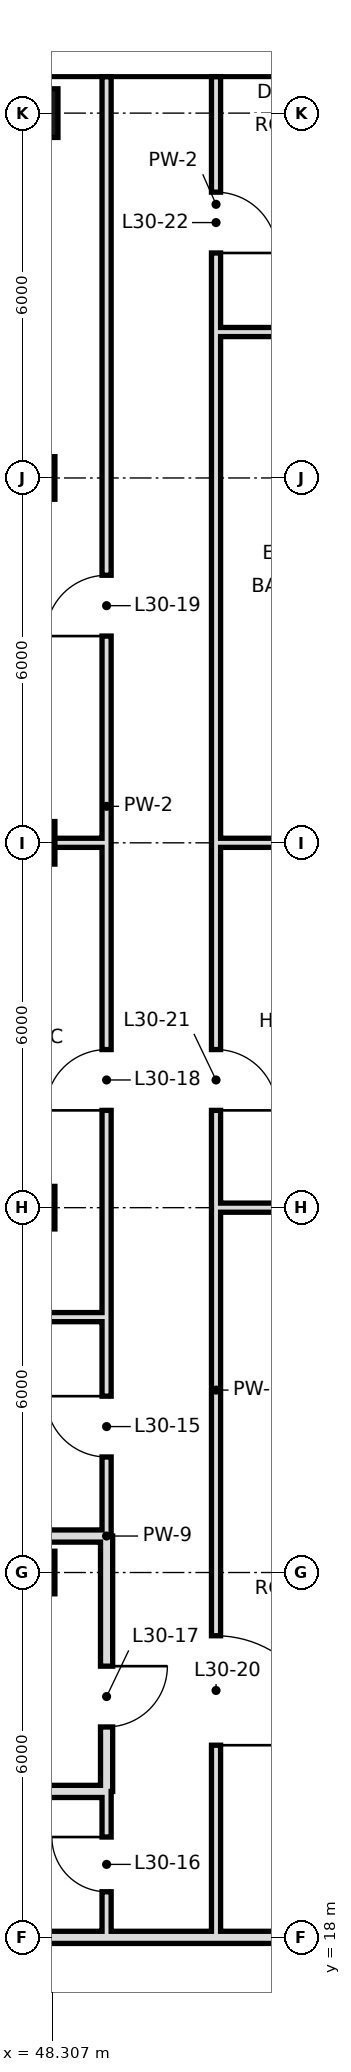
"""IFC4 building model, lengths in metres.
Left out: names, types, materials, properties, quantities, classifications, styles, units other than length and angle.
Written with IfcOpenShell. Run it as: python <this file> out.ifc"""

import sys

from ifc_helpers import new_model, si_unit, direction, frame, frame_2d, origin, origin_2d, place, context, subcontext, project, spatial, rectangle, hollow_rectangle, extrude, element, fill, save


model = new_model("IFC4")
c1 = context("Model", 3, precision=1e-05, world=origin(), true_north=direction((0.0, 1.0)))
c2 = subcontext(c1, "Body", "Model", "MODEL_VIEW")
j1 = project(units=[si_unit("LENGTHUNIT", "METRE"), si_unit("PLANEANGLEUNIT", "RADIAN")], contexts=[c1])
p1 = place(None, origin())
s1 = spatial("IfcSite", under=j1, at=p1, CompositionType="ELEMENT")
p2 = place(p1, origin())
s2 = spatial("IfcBuilding", under=s1, at=p2, CompositionType="ELEMENT")
p3 = place(p2, frame((0.0, 0.0, 134.0)))
s3 = spatial("IfcBuildingStorey", under=s2, at=p3, CompositionType="ELEMENT", Elevation=134.0)
for number, where, z_axis, x_axis in (
    (1, (48.0, 24.0, 0.0), (0.0, 0.0, 1.0), (1.0, 0.0, 0.0)),
    (2, (48.0, 30.0, 0.0), (0.0, 0.0, 1.0), (1.0, 0.0, 0.0)),
    (3, (48.0, 36.0, 0.0), (0.0, 0.0, 1.0), (1.0, 0.0, 0.0)),
    (4, (48.0, 42.0, 0.0), (0.0, 0.0, 1.0), (1.0, 0.0, 0.0)),
):
    element("IfcColumn", number, at=place(p3, frame(where, z_axis=z_axis, x_axis=x_axis)), inside=s3, PredefinedType="COLUMN", context=c2, shape_type="SweptSolid", body=[
        extrude(hollow_rectangle(XDim=0.7, YDim=0.7, WallThickness=0.036, at=origin_2d()), origin(), (0.0, 0.0, 1.0), 4.4),
    ])
p4 = place(p3, frame((48.0, 48.0, 0.0), z_axis=(0.0, 0.0, 1.0), x_axis=(1.0, 0.0, 0.0)))
e5 = element("IfcColumn", 5, at=p4, inside=s3, PredefinedType="COLUMN", context=c2, shape_type="SweptSolid", body=[
    extrude(hollow_rectangle(XDim=0.8, YDim=0.8, WallThickness=0.04, at=origin_2d()), origin(), (0.0, 0.0, 1.0), 4.4),
])
p5 = place(p3, frame((49.2, 20.4, 0.0), z_axis=(0.0, 0.0, 1.0), x_axis=(0.0, 1.0, 0.0)))
e6 = element("IfcWall", 6, at=p5, inside=s3, PredefinedType="SOLIDWALL", context=c2, shape_type="SweptSolid", body=[
    extrude(rectangle(XDim=4.2, YDim=0.2, at=frame_2d((2.1, 0.0))), origin(), (0.0, 0.0, 1.0), 3.4),
])
p6 = place(p5, frame((1.06, 0.0, 0.0)))
e7 = element("IfcOpeningElement", 7, at=p6, cuts=e6, PredefinedType="OPENING", context=c2, shape_type="SweptSolid", body=[
    extrude(rectangle(XDim=1.0, YDim=2.4, at=frame_2d((0.5, 1.2))), frame((0.0, 0.11, 0.0), z_axis=(0.0, -1.0, 0.0), x_axis=(1.0, 0.0, 0.0)), (0.0, 0.0, 1.0), 0.22),
])
p7 = place(p3, frame((49.2, 24.6, 0.0), z_axis=(0.0, 0.0, 1.0), x_axis=(0.0, 1.0, 0.0)))
e8 = element("IfcWall", 8, at=p7, inside=s3, PredefinedType="PARTITIONING", context=c2, shape_type="SweptSolid", body=[
    extrude(rectangle(XDim=24.0, YDim=0.15, at=frame_2d((12.0, 0.0))), origin(), (0.0, 0.0, 1.0), 4.1),
])
p8 = place(p7, frame((1.3, 0.0, 0.0)))
e9 = element("IfcOpeningElement", 9, at=p8, cuts=e8, PredefinedType="OPENING", context=c2, shape_type="SweptSolid", body=[
    extrude(rectangle(XDim=1.0, YDim=2.4, at=frame_2d((0.5, 1.2))), frame((0.0, 0.085, 0.0), z_axis=(0.0, -1.0, 0.0), x_axis=(1.0, 0.0, 0.0)), (0.0, 0.0, 1.0), 0.17),
])
p9 = place(p7, frame((7.0, 0.0, 0.0)))
e10 = element("IfcOpeningElement", 10, at=p9, cuts=e8, PredefinedType="OPENING", context=c2, shape_type="SweptSolid", body=[
    extrude(rectangle(XDim=1.0, YDim=2.4, at=frame_2d((0.5, 1.2))), frame((0.0, 0.085, 0.0), z_axis=(0.0, -1.0, 0.0), x_axis=(1.0, 0.0, 0.0)), (0.0, 0.0, 1.0), 0.17),
])
p10 = place(p7, frame((14.8, 0.0, 0.0)))
e11 = element("IfcOpeningElement", 11, at=p10, cuts=e8, PredefinedType="OPENING", context=c2, shape_type="SweptSolid", body=[
    extrude(rectangle(XDim=1.0, YDim=2.4, at=frame_2d((0.5, 1.2))), frame((0.0, 0.085, 0.0), z_axis=(0.0, -1.0, 0.0), x_axis=(1.0, 0.0, 0.0)), (0.0, 0.0, 1.0), 0.17),
])
p11 = place(p3, frame((49.2, 18.0, 0.0), z_axis=(0.0, 0.0, 1.0), x_axis=(0.0, 1.0, 0.0)))
e12 = element("IfcWall", 12, at=p11, inside=s3, PredefinedType="PARTITIONING", context=c2, shape_type="SweptSolid", body=[
    extrude(rectangle(XDim=2.4, YDim=0.15, at=frame_2d((1.2, 0.0))), origin(), (0.0, 0.0, 1.0), 4.1),
])
p12 = place(p11, frame((0.75, 0.0, 0.0)))
e13 = element("IfcOpeningElement", 13, at=p12, cuts=e12, PredefinedType="OPENING", context=c2, shape_type="SweptSolid", body=[
    extrude(rectangle(XDim=0.9, YDim=2.4, at=frame_2d((0.45, 1.2))), frame((0.0, 0.085, 0.0), z_axis=(0.0, -1.0, 0.0), x_axis=(1.0, 0.0, 0.0)), (0.0, 0.0, 1.0), 0.17),
])
p13 = place(p3, frame((51.0, 18.0, 0.0), z_axis=(0.0, 0.0, 1.0), x_axis=(0.0, 1.0, 0.0)))
e14 = element("IfcWall", 14, at=p13, inside=s3, PredefinedType="PARTITIONING", context=c2, shape_type="SweptSolid", body=[
    extrude(rectangle(XDim=18.0, YDim=0.15, at=frame_2d((9.0, 0.0))), origin(), (0.0, 0.0, 1.0), 4.1),
])
p14 = place(p13, frame((3.16, 0.0, 0.0)))
e15 = element("IfcOpeningElement", 15, at=p14, cuts=e14, PredefinedType="OPENING", context=c2, shape_type="SweptSolid", body=[
    extrude(rectangle(XDim=1.8, YDim=2.4, at=frame_2d((0.9, 1.2))), frame((0.0, 0.085, 0.0), z_axis=(0.0, -1.0, 0.0), x_axis=(1.0, 0.0, 0.0)), (0.0, 0.0, 1.0), 0.17),
])
p15 = place(p13, frame((13.6, 0.0, 0.0)))
e16 = element("IfcOpeningElement", 16, at=p15, cuts=e14, PredefinedType="OPENING", context=c2, shape_type="SweptSolid", body=[
    extrude(rectangle(XDim=1.0, YDim=2.4, at=frame_2d((0.5, 1.2))), frame((0.0, 0.085, 0.0), z_axis=(0.0, -1.0, 0.0), x_axis=(1.0, 0.0, 0.0)), (0.0, 0.0, 1.0), 0.17),
])
p16 = place(p3, frame((51.0, 44.4, 0.0), z_axis=(0.0, 0.0, 1.0), x_axis=(0.0, 1.0, 0.0)))
e17 = element("IfcWall", 17, at=p16, inside=s3, PredefinedType="PARTITIONING", context=c2, shape_type="SweptSolid", body=[
    extrude(rectangle(XDim=4.2, YDim=0.15, at=frame_2d((2.1, 0.0))), origin(), (0.0, 0.0, 1.0), 4.1),
])
p17 = place(p16, frame((1.3, 0.0, 0.0)))
e18 = element("IfcOpeningElement", 18, at=p17, cuts=e17, PredefinedType="OPENING", context=c2, shape_type="SweptSolid", body=[
    extrude(rectangle(XDim=1.0, YDim=2.4, at=frame_2d((0.5, 1.2))), frame((0.0, 0.085, 0.0), z_axis=(0.0, -1.0, 0.0), x_axis=(1.0, 0.0, 0.0)), (0.0, 0.0, 1.0), 0.17),
])
p18 = place(p3, frame((51.0, 36.0, 0.0), z_axis=(0.0, 0.0, 1.0), x_axis=(0.0, 1.0, 0.0)))
e19 = element("IfcWall", 19, at=p18, inside=s3, PredefinedType="PARTITIONING", context=c2, shape_type="SweptSolid", body=[
    extrude(rectangle(XDim=8.4, YDim=0.15, at=frame_2d((4.2, 0.0))), origin(), (0.0, 0.0, 1.0), 4.1),
])
p19 = place(p3, frame((44.902, 18.0, 0.0), z_axis=(0.0, 0.0, 1.0), x_axis=(1.0, 0.0, 0.0)))
e20 = element("IfcWall", 20, at=p19, inside=s3, PredefinedType="SOLIDWALL", context=c2, shape_type="SweptSolid", body=[
    extrude(rectangle(XDim=15.698, YDim=0.2, at=frame_2d((7.849, 0.0))), origin(), (0.0, 0.0, 1.0), 3.4),
])
p20 = place(p3, frame((44.9, 20.4, 0.0), z_axis=(0.0, 0.0, 1.0), x_axis=(1.0, 0.0, 0.0)))
e21 = element("IfcWall", 21, at=p20, inside=s3, PredefinedType="SOLIDWALL", context=c2, shape_type="SweptSolid", body=[
    extrude(rectangle(XDim=4.3, YDim=0.2, at=frame_2d((2.15, 0.0))), origin(), (0.0, 0.0, 1.0), 3.4),
])
p21 = place(p3, frame((44.9, 24.6, 0.0), z_axis=(0.0, 0.0, 1.0), x_axis=(1.0, 0.0, 0.0)))
e22 = element("IfcWall", 22, at=p21, inside=s3, PredefinedType="SOLIDWALL", context=c2, shape_type="SweptSolid", body=[
    extrude(rectangle(XDim=4.3, YDim=0.2, at=frame_2d((2.15, 0.0))), origin(), (0.0, 0.0, 1.0), 3.65),
])
p22 = place(p3, frame((44.9, 28.2, 0.0), z_axis=(0.0, 0.0, 1.0), x_axis=(1.0, 0.0, 0.0)))
e23 = element("IfcWall", 23, at=p22, inside=s3, PredefinedType="PARTITIONING", context=c2, shape_type="SweptSolid", body=[
    extrude(rectangle(XDim=4.3, YDim=0.15, at=frame_2d((2.15, 0.0))), origin(), (0.0, 0.0, 1.0), 4.1),
])
p23 = place(p3, frame((51.0, 30.0, 0.0), z_axis=(0.0, 0.0, 1.0), x_axis=(1.0, 0.0, 0.0)))
e24 = element("IfcWall", 24, at=p23, inside=s3, PredefinedType="PARTITIONING", context=c2, shape_type="SweptSolid", body=[
    extrude(rectangle(XDim=9.6, YDim=0.15, at=frame_2d((4.8, 0.0))), origin(), (0.0, 0.0, 1.0), 3.4),
])
p24 = place(p3, frame((44.9, 36.0, 0.0), z_axis=(0.0, 0.0, 1.0), x_axis=(1.0, 0.0, 0.0)))
e25 = element("IfcWall", 25, at=p24, inside=s3, PredefinedType="PARTITIONING", context=c2, shape_type="SweptSolid", body=[
    extrude(rectangle(XDim=4.3, YDim=0.15, at=frame_2d((2.15, 0.0))), origin(), (0.0, 0.0, 1.0), 3.4),
])
p25 = place(p3, frame((51.0, 36.0, 0.0), z_axis=(0.0, 0.0, 1.0), x_axis=(1.0, 0.0, 0.0)))
e26 = element("IfcWall", 26, at=p25, inside=s3, PredefinedType="PARTITIONING", context=c2, shape_type="SweptSolid", body=[
    extrude(rectangle(XDim=3.0, YDim=0.15, at=frame_2d((1.5, 0.0))), origin(), (0.0, 0.0, 1.0), 3.4),
])
p26 = place(p3, frame((51.0, 44.4, 0.0), z_axis=(0.0, 0.0, 1.0), x_axis=(1.0, 0.0, 0.0)))
e27 = element("IfcWall", 27, at=p26, inside=s3, PredefinedType="PARTITIONING", context=c2, shape_type="SweptSolid", body=[
    extrude(rectangle(XDim=3.0, YDim=0.15, at=frame_2d((1.5, 0.0))), origin(), (0.0, 0.0, 1.0), 4.1),
])
p27 = place(p8, frame((1.0, 0.0, 0.0), z_axis=(0.0, 0.0, 1.0), x_axis=(-1.0, 0.0, 0.0)))
e28 = element("IfcDoor", 28, at=p27, inside=s3, OperationType="SINGLE_SWING_LEFT", PredefinedType="DOOR", context=c2, shape_type="SweptSolid", body=[
    extrude(rectangle(XDim=1.0, YDim=2.4, at=frame_2d((0.5, 1.2))), frame((0.0, 0.025, 0.0), z_axis=(0.0, -1.0, 0.0), x_axis=(1.0, 0.0, 0.0)), (0.0, 0.0, 1.0), 0.05),
])
fill(e9, e28)
p28 = place(p12, frame((0.9, 0.0, 0.0), z_axis=(0.0, 0.0, 1.0), x_axis=(-1.0, 0.0, 0.0)))
e29 = element("IfcDoor", 29, at=p28, inside=s3, OperationType="SINGLE_SWING_LEFT", PredefinedType="DOOR", context=c2, shape_type="SweptSolid", body=[
    extrude(rectangle(XDim=0.9, YDim=2.4, at=frame_2d((0.45, 1.2))), frame((0.0, 0.025, 0.0), z_axis=(0.0, -1.0, 0.0), x_axis=(1.0, 0.0, 0.0)), (0.0, 0.0, 1.0), 0.05),
])
fill(e13, e29)
p29 = place(p6, origin())
e30 = element("IfcDoor", 30, at=p29, inside=s3, OperationType="SINGLE_SWING_RIGHT", PredefinedType="DOOR", context=c2, shape_type="SweptSolid", body=[
    extrude(rectangle(XDim=1.0, YDim=2.4, at=frame_2d((0.5, 1.2))), frame((0.0, 0.025, 0.0), z_axis=(0.0, -1.0, 0.0), x_axis=(1.0, 0.0, 0.0)), (0.0, 0.0, 1.0), 0.05),
])
fill(e7, e30)
p30 = place(p9, origin())
e31 = element("IfcDoor", 31, at=p30, inside=s3, OperationType="SINGLE_SWING_LEFT", PredefinedType="DOOR", context=c2, shape_type="SweptSolid", body=[
    extrude(rectangle(XDim=1.0, YDim=2.4, at=frame_2d((0.5, 1.2))), frame((0.0, 0.025, 0.0), z_axis=(0.0, -1.0, 0.0), x_axis=(1.0, 0.0, 0.0)), (0.0, 0.0, 1.0), 0.05),
])
fill(e10, e31)
p31 = place(p10, origin())
e32 = element("IfcDoor", 32, at=p31, inside=s3, OperationType="SINGLE_SWING_LEFT", PredefinedType="DOOR", context=c2, shape_type="SweptSolid", body=[
    extrude(rectangle(XDim=1.0, YDim=2.4, at=frame_2d((0.5, 1.2))), frame((0.0, 0.025, 0.0), z_axis=(0.0, -1.0, 0.0), x_axis=(1.0, 0.0, 0.0)), (0.0, 0.0, 1.0), 0.05),
])
fill(e11, e32)
p32 = place(p14, frame((1.8, 0.0, 0.0), z_axis=(0.0, 0.0, 1.0), x_axis=(-1.0, 0.0, 0.0)))
e33 = element("IfcDoor", 33, at=p32, inside=s3, OperationType="SINGLE_SWING_RIGHT", PredefinedType="DOOR", context=c2, shape_type="SweptSolid", body=[
    extrude(rectangle(XDim=1.8, YDim=2.4, at=frame_2d((0.9, 1.2))), frame((0.0, 0.025, 0.0), z_axis=(0.0, -1.0, 0.0), x_axis=(1.0, 0.0, 0.0)), (0.0, 0.0, 1.0), 0.05),
])
fill(e15, e33)
p33 = place(p15, frame((1.0, 0.0, 0.0), z_axis=(0.0, 0.0, 1.0), x_axis=(-1.0, 0.0, 0.0)))
e34 = element("IfcDoor", 34, at=p33, inside=s3, OperationType="SINGLE_SWING_RIGHT", PredefinedType="DOOR", context=c2, shape_type="SweptSolid", body=[
    extrude(rectangle(XDim=1.0, YDim=2.4, at=frame_2d((0.5, 1.2))), frame((0.0, 0.025, 0.0), z_axis=(0.0, -1.0, 0.0), x_axis=(1.0, 0.0, 0.0)), (0.0, 0.0, 1.0), 0.05),
])
fill(e16, e34)
p34 = place(p17, frame((1.0, 0.0, 0.0), z_axis=(0.0, 0.0, 1.0), x_axis=(-1.0, 0.0, 0.0)))
e35 = element("IfcDoor", 35, at=p34, inside=s3, OperationType="SINGLE_SWING_RIGHT", PredefinedType="DOOR", context=c2, shape_type="SweptSolid", body=[
    extrude(rectangle(XDim=1.0, YDim=2.4, at=frame_2d((0.5, 1.2))), frame((0.0, 0.025, 0.0), z_axis=(0.0, -1.0, 0.0), x_axis=(1.0, 0.0, 0.0)), (0.0, 0.0, 1.0), 0.05),
])
fill(e18, e35)
save(model, sys.argv[1])
